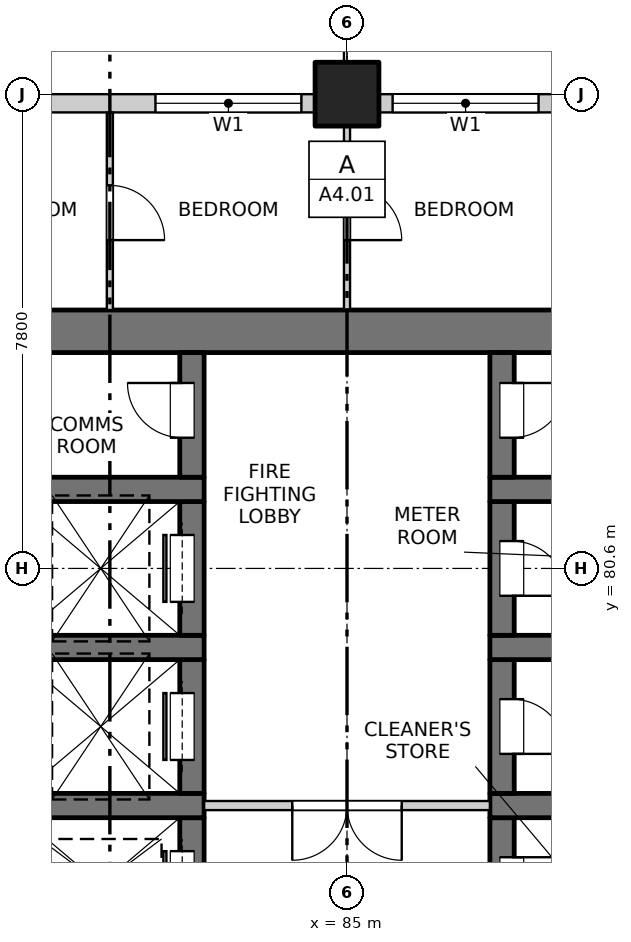
"""IFC4 building model, lengths in metres.
Left out: names, types, materials, properties, quantities, classifications, styles, units other than length and angle.
Written with IfcOpenShell. Run it as: python <this file> out.ifc"""

import sys

from ifc_helpers import new_model, si_unit, direction, frame, frame_2d, origin, origin_2d, place, context, subcontext, project, spatial, rectangle, extrude, element, fill, save


model = new_model("IFC4")
c1 = context("Model", 3, precision=1e-05, world=origin(), true_north=direction((0.0, 1.0)))
c2 = subcontext(c1, "Body", "Model", "MODEL_VIEW")
j1 = project(units=[si_unit("LENGTHUNIT", "METRE"), si_unit("PLANEANGLEUNIT", "RADIAN")], contexts=[c1])
p1 = place(None, origin())
s1 = spatial("IfcSite", under=j1, at=p1, CompositionType="ELEMENT")
p2 = place(p1, origin())
s2 = spatial("IfcBuilding", under=s1, at=p2, CompositionType="ELEMENT")
p3 = place(p2, frame((0.0, 0.0, 19.5)))
s3 = spatial("IfcBuildingStorey", under=s2, at=p3, CompositionType="ELEMENT", Elevation=19.5)
p4 = place(p3, frame((85.0, 88.4, -0.25), z_axis=(0.0, 0.0, 1.0), x_axis=(1.0, 0.0, 0.0)))
e1 = element("IfcColumn", 1, at=p4, inside=s3, PredefinedType="COLUMN", context=c2, shape_type="SweptSolid", body=[
    extrude(rectangle(XDim=1.05, YDim=1.05, at=origin_2d()), origin(), (0.0, 0.0, 1.0), 3.4),
])
p5 = place(p3, frame((75.6, 84.5, -0.25), z_axis=(0.0, 0.0, 1.0), x_axis=(1.0, 0.0, 0.0)))
e2 = element("IfcWall", 2, at=p5, inside=s3, PredefinedType="SOLIDWALL", context=c2, shape_type="SweptSolid", body=[
    extrude(rectangle(XDim=18.8, YDim=0.7, at=frame_2d((9.4, 0.0))), origin(), (0.0, 0.0, 1.0), 3.4),
])
p6 = place(p3, frame((82.45, 74.3, -0.25), z_axis=(0.0, 0.0, 1.0), x_axis=(0.0, 1.0, 0.0)))
e3 = element("IfcWall", 3, at=p6, inside=s3, PredefinedType="SOLIDWALL", context=c2, shape_type="SweptSolid", body=[
    extrude(rectangle(XDim=2.2, YDim=0.4, at=frame_2d((1.1, 0.0))), origin(), (0.0, 0.0, 1.0), 3.4),
])
p7 = place(p6, frame((0.55, 0.0, 0.25)))
e4 = element("IfcOpeningElement", 4, at=p7, cuts=e3, PredefinedType="OPENING", context=c2, shape_type="SweptSolid", body=[
    extrude(rectangle(XDim=1.1, YDim=2.1, at=frame_2d((0.55, 1.05))), frame((0.0, 0.21, 0.0), z_axis=(0.0, -1.0, 0.0), x_axis=(1.0, 0.0, 0.0)), (0.0, 0.0, 1.0), 0.42),
])
p8 = place(p3, frame((79.65, 76.7, -0.25), z_axis=(0.0, 0.0, 1.0), x_axis=(1.0, 0.0, 0.0)))
e5 = element("IfcWall", 5, at=p8, inside=s3, PredefinedType="SOLIDWALL", context=c2, shape_type="SweptSolid", body=[
    extrude(rectangle(XDim=3.0, YDim=0.4, at=frame_2d((1.5, 0.0))), origin(), (0.0, 0.0, 1.0), 3.4),
])
p9 = place(p3, frame((82.45, 76.9, -0.25), z_axis=(0.0, 0.0, 1.0), x_axis=(0.0, 1.0, 0.0)))
e6 = element("IfcWall", 6, at=p9, inside=s3, PredefinedType="SOLIDWALL", context=c2, shape_type="SweptSolid", body=[
    extrude(rectangle(XDim=2.2, YDim=0.4, at=frame_2d((1.1, 0.0))), origin(), (0.0, 0.0, 1.0), 3.4),
])
p10 = place(p9, frame((0.55, 0.0, 0.25)))
e7 = element("IfcOpeningElement", 7, at=p10, cuts=e6, PredefinedType="OPENING", context=c2, shape_type="SweptSolid", body=[
    extrude(rectangle(XDim=1.1, YDim=2.1, at=frame_2d((0.55, 1.05))), frame((0.0, 0.21, 0.0), z_axis=(0.0, -1.0, 0.0), x_axis=(1.0, 0.0, 0.0)), (0.0, 0.0, 1.0), 0.42),
])
p11 = place(p3, frame((79.65, 79.3, -0.25), z_axis=(0.0, 0.0, 1.0), x_axis=(1.0, 0.0, 0.0)))
e8 = element("IfcWall", 8, at=p11, inside=s3, PredefinedType="SOLIDWALL", context=c2, shape_type="SweptSolid", body=[
    extrude(rectangle(XDim=3.0, YDim=0.4, at=frame_2d((1.5, 0.0))), origin(), (0.0, 0.0, 1.0), 3.4),
])
p12 = place(p3, frame((82.45, 79.5, -0.25), z_axis=(0.0, 0.0, 1.0), x_axis=(0.0, 1.0, 0.0)))
e9 = element("IfcWall", 9, at=p12, inside=s3, PredefinedType="SOLIDWALL", context=c2, shape_type="SweptSolid", body=[
    extrude(rectangle(XDim=2.2, YDim=0.4, at=frame_2d((1.1, 0.0))), origin(), (0.0, 0.0, 1.0), 3.4),
])
p13 = place(p12, frame((0.55, 0.0, 0.25)))
e10 = element("IfcOpeningElement", 10, at=p13, cuts=e9, PredefinedType="OPENING", context=c2, shape_type="SweptSolid", body=[
    extrude(rectangle(XDim=1.1, YDim=2.1, at=frame_2d((0.55, 1.05))), frame((0.0, 0.21, 0.0), z_axis=(0.0, -1.0, 0.0), x_axis=(1.0, 0.0, 0.0)), (0.0, 0.0, 1.0), 0.42),
])
p14 = place(p3, frame((79.65, 81.9, -0.25), z_axis=(0.0, 0.0, 1.0), x_axis=(1.0, 0.0, 0.0)))
e11 = element("IfcWall", 11, at=p14, inside=s3, PredefinedType="SOLIDWALL", context=c2, shape_type="SweptSolid", body=[
    extrude(rectangle(XDim=3.0, YDim=0.4, at=frame_2d((1.5, 0.0))), origin(), (0.0, 0.0, 1.0), 3.4),
])
p15 = place(p3, frame((82.45, 82.1, -0.25), z_axis=(0.0, 0.0, 1.0), x_axis=(0.0, 1.0, 0.0)))
e12 = element("IfcWall", 12, at=p15, inside=s3, PredefinedType="SOLIDWALL", context=c2, shape_type="SweptSolid", body=[
    extrude(rectangle(XDim=2.05, YDim=0.4, at=frame_2d((1.025, 0.0))), origin(), (0.0, 0.0, 1.0), 3.4),
])
p16 = place(p15, frame((0.65, 0.0, 0.25)))
e13 = element("IfcOpeningElement", 13, at=p16, cuts=e12, PredefinedType="OPENING", context=c2, shape_type="SweptSolid", body=[
    extrude(rectangle(XDim=0.9, YDim=2.1, at=frame_2d((0.45, 1.05))), frame((0.0, 0.21, 0.0), z_axis=(0.0, -1.0, 0.0), x_axis=(1.0, 0.0, 0.0)), (0.0, 0.0, 1.0), 0.42),
])
p17 = place(p3, frame((87.55, 74.3, -0.25), z_axis=(0.0, 0.0, 1.0), x_axis=(0.0, 1.0, 0.0)))
e14 = element("IfcWall", 14, at=p17, inside=s3, PredefinedType="SOLIDWALL", context=c2, shape_type="SweptSolid", body=[
    extrude(rectangle(XDim=2.2, YDim=0.4, at=frame_2d((1.1, 0.0))), origin(), (0.0, 0.0, 1.0), 3.4),
])
p18 = place(p17, frame((0.65, 0.0, 0.25)))
e15 = element("IfcOpeningElement", 15, at=p18, cuts=e14, PredefinedType="OPENING", context=c2, shape_type="SweptSolid", body=[
    extrude(rectangle(XDim=0.9, YDim=2.1, at=frame_2d((0.45, 1.05))), frame((0.0, 0.21, 0.0), z_axis=(0.0, -1.0, 0.0), x_axis=(1.0, 0.0, 0.0)), (0.0, 0.0, 1.0), 0.42),
])
p19 = place(p3, frame((87.35, 76.7, -0.25), z_axis=(0.0, 0.0, 1.0), x_axis=(1.0, 0.0, 0.0)))
e16 = element("IfcWall", 16, at=p19, inside=s3, PredefinedType="SOLIDWALL", context=c2, shape_type="SweptSolid", body=[
    extrude(rectangle(XDim=3.0, YDim=0.4, at=frame_2d((1.5, 0.0))), origin(), (0.0, 0.0, 1.0), 3.4),
])
p20 = place(p3, frame((87.55, 76.9, -0.25), z_axis=(0.0, 0.0, 1.0), x_axis=(0.0, 1.0, 0.0)))
e17 = element("IfcWall", 17, at=p20, inside=s3, PredefinedType="SOLIDWALL", context=c2, shape_type="SweptSolid", body=[
    extrude(rectangle(XDim=2.2, YDim=0.4, at=frame_2d((1.1, 0.0))), origin(), (0.0, 0.0, 1.0), 3.4),
])
p21 = place(p20, frame((0.65, 0.0, 0.25)))
e18 = element("IfcOpeningElement", 18, at=p21, cuts=e17, PredefinedType="OPENING", context=c2, shape_type="SweptSolid", body=[
    extrude(rectangle(XDim=0.9, YDim=2.1, at=frame_2d((0.45, 1.05))), frame((0.0, 0.21, 0.0), z_axis=(0.0, -1.0, 0.0), x_axis=(1.0, 0.0, 0.0)), (0.0, 0.0, 1.0), 0.42),
])
p22 = place(p3, frame((87.35, 79.3, -0.25), z_axis=(0.0, 0.0, 1.0), x_axis=(1.0, 0.0, 0.0)))
e19 = element("IfcWall", 19, at=p22, inside=s3, PredefinedType="SOLIDWALL", context=c2, shape_type="SweptSolid", body=[
    extrude(rectangle(XDim=3.0, YDim=0.4, at=frame_2d((1.5, 0.0))), origin(), (0.0, 0.0, 1.0), 3.4),
])
p23 = place(p3, frame((87.55, 79.5, -0.25), z_axis=(0.0, 0.0, 1.0), x_axis=(0.0, 1.0, 0.0)))
e20 = element("IfcWall", 20, at=p23, inside=s3, PredefinedType="SOLIDWALL", context=c2, shape_type="SweptSolid", body=[
    extrude(rectangle(XDim=2.2, YDim=0.4, at=frame_2d((1.1, 0.0))), origin(), (0.0, 0.0, 1.0), 3.4),
])
p24 = place(p23, frame((0.65, 0.0, 0.25)))
e21 = element("IfcOpeningElement", 21, at=p24, cuts=e20, PredefinedType="OPENING", context=c2, shape_type="SweptSolid", body=[
    extrude(rectangle(XDim=0.9, YDim=2.1, at=frame_2d((0.45, 1.05))), frame((0.0, 0.21, 0.0), z_axis=(0.0, -1.0, 0.0), x_axis=(1.0, 0.0, 0.0)), (0.0, 0.0, 1.0), 0.42),
])
p25 = place(p3, frame((87.35, 81.9, -0.25), z_axis=(0.0, 0.0, 1.0), x_axis=(1.0, 0.0, 0.0)))
e22 = element("IfcWall", 22, at=p25, inside=s3, PredefinedType="SOLIDWALL", context=c2, shape_type="SweptSolid", body=[
    extrude(rectangle(XDim=3.0, YDim=0.4, at=frame_2d((1.5, 0.0))), origin(), (0.0, 0.0, 1.0), 3.4),
])
p26 = place(p3, frame((87.55, 82.1, -0.25), z_axis=(0.0, 0.0, 1.0), x_axis=(0.0, 1.0, 0.0)))
e23 = element("IfcWall", 23, at=p26, inside=s3, PredefinedType="SOLIDWALL", context=c2, shape_type="SweptSolid", body=[
    extrude(rectangle(XDim=2.05, YDim=0.4, at=frame_2d((1.025, 0.0))), origin(), (0.0, 0.0, 1.0), 3.4),
])
p27 = place(p26, frame((0.65, 0.0, 0.25)))
e24 = element("IfcOpeningElement", 24, at=p27, cuts=e23, PredefinedType="OPENING", context=c2, shape_type="SweptSolid", body=[
    extrude(rectangle(XDim=0.9, YDim=2.1, at=frame_2d((0.45, 1.05))), frame((0.0, 0.21, 0.0), z_axis=(0.0, -1.0, 0.0), x_axis=(1.0, 0.0, 0.0)), (0.0, 0.0, 1.0), 0.42),
])
p28 = place(p3, frame((77.725, 88.25, 0.0), z_axis=(0.0, 0.0, 1.0), x_axis=(1.0, 0.0, 0.0)))
e25 = element("IfcWall", 25, at=p28, inside=s3, PredefinedType="SOLIDWALL", context=c2, shape_type="SweptSolid", body=[
    extrude(rectangle(XDim=6.75, YDim=0.3, at=frame_2d((3.375, 0.0))), origin(), (0.0, 0.0, 1.0), 2.7),
])
p29 = place(p28, frame((0.525, 0.0, 0.0)))
e26 = element("IfcOpeningElement", 26, at=p29, cuts=e25, PredefinedType="OPENING", context=c2, shape_type="SweptSolid", body=[
    extrude(rectangle(XDim=1.8, YDim=2.4, at=frame_2d((0.9, 1.2))), frame((0.0, 0.16, 0.0), z_axis=(0.0, -1.0, 0.0), x_axis=(1.0, 0.0, 0.0)), (0.0, 0.0, 1.0), 0.32),
])
p30 = place(p28, frame((4.125, 0.0, 0.9)))
e27 = element("IfcOpeningElement", 27, at=p30, cuts=e25, PredefinedType="OPENING", context=c2, shape_type="SweptSolid", body=[
    extrude(rectangle(XDim=2.4, YDim=1.8, at=frame_2d((1.2, 0.9))), frame((0.0, 0.16, 0.0), z_axis=(0.0, -1.0, 0.0), x_axis=(1.0, 0.0, 0.0)), (0.0, 0.0, 1.0), 0.32),
])
p31 = place(p3, frame((85.525, 88.25, 0.0), z_axis=(0.0, 0.0, 1.0), x_axis=(1.0, 0.0, 0.0)))
e28 = element("IfcWall", 28, at=p31, inside=s3, PredefinedType="SOLIDWALL", context=c2, shape_type="SweptSolid", body=[
    extrude(rectangle(XDim=6.75, YDim=0.3, at=frame_2d((3.375, 0.0))), origin(), (0.0, 0.0, 1.0), 2.7),
])
p32 = place(p31, frame((0.225, 0.0, 0.9)))
e29 = element("IfcOpeningElement", 29, at=p32, cuts=e28, PredefinedType="OPENING", context=c2, shape_type="SweptSolid", body=[
    extrude(rectangle(XDim=2.4, YDim=1.8, at=frame_2d((1.2, 0.9))), frame((0.0, 0.16, 0.0), z_axis=(0.0, -1.0, 0.0), x_axis=(1.0, 0.0, 0.0)), (0.0, 0.0, 1.0), 0.32),
])
p33 = place(p31, frame((4.125, 0.0, 0.9)))
e30 = element("IfcOpeningElement", 30, at=p33, cuts=e28, PredefinedType="OPENING", context=c2, shape_type="SweptSolid", body=[
    extrude(rectangle(XDim=2.4, YDim=1.8, at=frame_2d((1.2, 0.9))), frame((0.0, 0.16, 0.0), z_axis=(0.0, -1.0, 0.0), x_axis=(1.0, 0.0, 0.0)), (0.0, 0.0, 1.0), 0.32),
])
p34 = place(p3, frame((82.65, 76.7, 0.0), z_axis=(0.0, 0.0, 1.0), x_axis=(1.0, 0.0, 0.0)))
e31 = element("IfcWall", 31, at=p34, inside=s3, PredefinedType="PARTITIONING", context=c2, shape_type="SweptSolid", body=[
    extrude(rectangle(XDim=4.7, YDim=0.15, at=frame_2d((2.35, 0.0))), origin(), (0.0, 0.0, 1.0), 3.15),
])
p35 = place(p34, frame((1.45, 0.0, 0.0)))
e32 = element("IfcOpeningElement", 32, at=p35, cuts=e31, PredefinedType="OPENING", context=c2, shape_type="SweptSolid", body=[
    extrude(rectangle(XDim=1.8, YDim=2.1, at=frame_2d((0.9, 1.05))), frame((0.0, 0.085, 0.0), z_axis=(0.0, -1.0, 0.0), x_axis=(1.0, 0.0, 0.0)), (0.0, 0.0, 1.0), 0.17),
])
p36 = place(p3, frame((81.1, 84.85, 0.0), z_axis=(0.0, 0.0, 1.0), x_axis=(0.0, 1.0, 0.0)))
e33 = element("IfcWall", 33, at=p36, inside=s3, PredefinedType="PARTITIONING", context=c2, shape_type="SweptSolid", body=[
    extrude(rectangle(XDim=3.25, YDim=0.1, at=frame_2d((1.625, 0.0))), origin(), (0.0, 0.0, 1.0), 3.15),
])
p37 = place(p36, frame((1.15, 0.0, 0.0)))
e34 = element("IfcOpeningElement", 34, at=p37, cuts=e33, PredefinedType="OPENING", context=c2, shape_type="SweptSolid", body=[
    extrude(rectangle(XDim=0.9, YDim=2.1, at=frame_2d((0.45, 1.05))), frame((0.0, 0.06, 0.0), z_axis=(0.0, -1.0, 0.0), x_axis=(1.0, 0.0, 0.0)), (0.0, 0.0, 1.0), 0.12),
])
p38 = place(p3, frame((85.0, 84.85, 0.0), z_axis=(0.0, 0.0, 1.0), x_axis=(0.0, 1.0, 0.0)))
e35 = element("IfcWall", 35, at=p38, inside=s3, PredefinedType="PARTITIONING", context=c2, shape_type="SweptSolid", body=[
    extrude(rectangle(XDim=3.25, YDim=0.1, at=frame_2d((1.625, 0.0))), origin(), (0.0, 0.0, 1.0), 3.15),
])
p39 = place(p38, frame((1.15, 0.0, 0.0)))
e36 = element("IfcOpeningElement", 36, at=p39, cuts=e35, PredefinedType="OPENING", context=c2, shape_type="SweptSolid", body=[
    extrude(rectangle(XDim=0.9, YDim=2.1, at=frame_2d((0.45, 1.05))), frame((0.0, 0.06, 0.0), z_axis=(0.0, -1.0, 0.0), x_axis=(1.0, 0.0, 0.0)), (0.0, 0.0, 1.0), 0.12),
])
p40 = place(p30, origin())
e37 = element("IfcWindow", 37, at=p40, inside=s3, PartitioningType="DOUBLE_PANEL_VERTICAL", PredefinedType="WINDOW", context=c2, shape_type="SweptSolid", body=[
    extrude(rectangle(XDim=2.4, YDim=1.8, at=frame_2d((1.2, 0.9))), frame((0.0, 0.03, 0.0), z_axis=(0.0, -1.0, 0.0), x_axis=(1.0, 0.0, 0.0)), (0.0, 0.0, 1.0), 0.06),
])
fill(e27, e37)
p41 = place(p32, origin())
e38 = element("IfcWindow", 38, at=p41, inside=s3, PartitioningType="DOUBLE_PANEL_VERTICAL", PredefinedType="WINDOW", context=c2, shape_type="SweptSolid", body=[
    extrude(rectangle(XDim=2.4, YDim=1.8, at=frame_2d((1.2, 0.9))), frame((0.0, 0.03, 0.0), z_axis=(0.0, -1.0, 0.0), x_axis=(1.0, 0.0, 0.0)), (0.0, 0.0, 1.0), 0.06),
])
fill(e29, e38)
p42 = place(p7, origin())
e39 = element("IfcDoor", 39, at=p42, inside=s3, OperationType="SLIDING_TO_LEFT", PredefinedType="DOOR", context=c2, shape_type="SweptSolid", body=[
    extrude(rectangle(XDim=1.1, YDim=2.1, at=frame_2d((0.55, 1.05))), frame((0.0, 0.185, 0.0), z_axis=(0.0, -1.0, 0.0), x_axis=(1.0, 0.0, 0.0)), (0.0, 0.0, 1.0), 0.05),
])
fill(e4, e39)
p43 = place(p18, origin())
e40 = element("IfcDoor", 40, at=p43, inside=s3, OperationType="SINGLE_SWING_LEFT", PredefinedType="DOOR", context=c2, shape_type="SweptSolid", body=[
    extrude(rectangle(XDim=0.9, YDim=2.1, at=frame_2d((0.45, 1.05))), frame((0.0, -0.135, 0.0), z_axis=(0.0, -1.0, 0.0), x_axis=(1.0, 0.0, 0.0)), (0.0, 0.0, 1.0), 0.05),
])
fill(e15, e40)
p44 = place(p35, origin())
e41 = element("IfcDoor", 41, at=p44, inside=s3, OperationType="DOUBLE_DOOR_SINGLE_SWING", PredefinedType="DOOR", context=c2, shape_type="SweptSolid", body=[
    extrude(rectangle(XDim=1.8, YDim=2.1, at=frame_2d((0.9, 1.05))), frame((0.0, 0.025, 0.0), z_axis=(0.0, -1.0, 0.0), x_axis=(1.0, 0.0, 0.0)), (0.0, 0.0, 1.0), 0.05),
])
fill(e32, e41)
p45 = place(p10, origin())
e42 = element("IfcDoor", 42, at=p45, inside=s3, OperationType="SLIDING_TO_LEFT", PredefinedType="DOOR", context=c2, shape_type="SweptSolid", body=[
    extrude(rectangle(XDim=1.1, YDim=2.1, at=frame_2d((0.55, 1.05))), frame((0.0, 0.185, 0.0), z_axis=(0.0, -1.0, 0.0), x_axis=(1.0, 0.0, 0.0)), (0.0, 0.0, 1.0), 0.05),
])
fill(e7, e42)
p46 = place(p21, origin())
e43 = element("IfcDoor", 43, at=p46, inside=s3, OperationType="SINGLE_SWING_RIGHT", PredefinedType="DOOR", context=c2, shape_type="SweptSolid", body=[
    extrude(rectangle(XDim=0.9, YDim=2.1, at=frame_2d((0.45, 1.05))), frame((0.0, -0.135, 0.0), z_axis=(0.0, -1.0, 0.0), x_axis=(1.0, 0.0, 0.0)), (0.0, 0.0, 1.0), 0.05),
])
fill(e18, e43)
p47 = place(p13, origin())
e44 = element("IfcDoor", 44, at=p47, inside=s3, OperationType="SLIDING_TO_LEFT", PredefinedType="DOOR", context=c2, shape_type="SweptSolid", body=[
    extrude(rectangle(XDim=1.1, YDim=2.1, at=frame_2d((0.55, 1.05))), frame((0.0, 0.185, 0.0), z_axis=(0.0, -1.0, 0.0), x_axis=(1.0, 0.0, 0.0)), (0.0, 0.0, 1.0), 0.05),
])
fill(e10, e44)
p48 = place(p24, origin())
e45 = element("IfcDoor", 45, at=p48, inside=s3, OperationType="SINGLE_SWING_RIGHT", PredefinedType="DOOR", context=c2, shape_type="SweptSolid", body=[
    extrude(rectangle(XDim=0.9, YDim=2.1, at=frame_2d((0.45, 1.05))), frame((0.0, -0.135, 0.0), z_axis=(0.0, -1.0, 0.0), x_axis=(1.0, 0.0, 0.0)), (0.0, 0.0, 1.0), 0.05),
])
fill(e21, e45)
p49 = place(p16, origin())
e46 = element("IfcDoor", 46, at=p49, inside=s3, OperationType="SINGLE_SWING_RIGHT", PredefinedType="DOOR", context=c2, shape_type="SweptSolid", body=[
    extrude(rectangle(XDim=0.9, YDim=2.1, at=frame_2d((0.45, 1.05))), frame((0.0, 0.185, 0.0), z_axis=(0.0, -1.0, 0.0), x_axis=(1.0, 0.0, 0.0)), (0.0, 0.0, 1.0), 0.05),
])
fill(e13, e46)
p50 = place(p27, origin())
e47 = element("IfcDoor", 47, at=p50, inside=s3, OperationType="SINGLE_SWING_LEFT", PredefinedType="DOOR", context=c2, shape_type="SweptSolid", body=[
    extrude(rectangle(XDim=0.9, YDim=2.1, at=frame_2d((0.45, 1.05))), frame((0.0, -0.135, 0.0), z_axis=(0.0, -1.0, 0.0), x_axis=(1.0, 0.0, 0.0)), (0.0, 0.0, 1.0), 0.05),
])
fill(e24, e47)
p51 = place(p37, origin())
e48 = element("IfcDoor", 48, at=p51, inside=s3, OperationType="SINGLE_SWING_RIGHT", PredefinedType="DOOR", context=c2, shape_type="SweptSolid", body=[
    extrude(rectangle(XDim=0.9, YDim=2.1, at=frame_2d((0.45, 1.05))), frame((0.0, 0.025, 0.0), z_axis=(0.0, -1.0, 0.0), x_axis=(1.0, 0.0, 0.0)), (0.0, 0.0, 1.0), 0.05),
])
fill(e34, e48)
p52 = place(p39, origin())
e49 = element("IfcDoor", 49, at=p52, inside=s3, OperationType="SINGLE_SWING_RIGHT", PredefinedType="DOOR", context=c2, shape_type="SweptSolid", body=[
    extrude(rectangle(XDim=0.9, YDim=2.1, at=frame_2d((0.45, 1.05))), frame((0.0, 0.025, 0.0), z_axis=(0.0, -1.0, 0.0), x_axis=(1.0, 0.0, 0.0)), (0.0, 0.0, 1.0), 0.05),
])
fill(e36, e49)
save(model, sys.argv[1])
